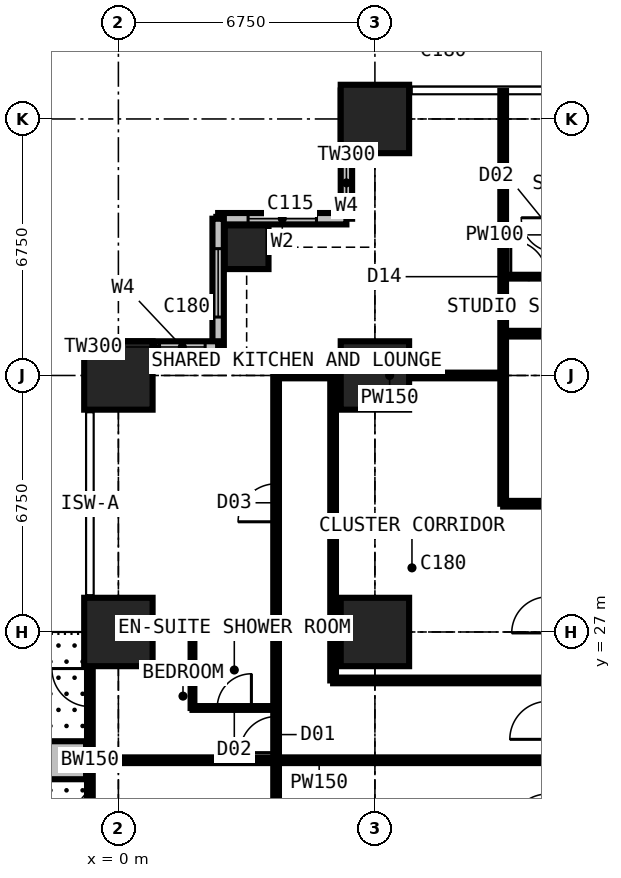
"""IFC4 building model, lengths in metres.
Left out: names, types, materials, properties, quantities, classifications, styles, units other than length and angle.
Written with IfcOpenShell. Run it as: python <this file> out.ifc"""

import sys

from ifc_helpers import new_model, si_unit, direction, frame, frame_2d, origin, origin_2d, place, context, subcontext, project, spatial, rectangle, extrude, element, fill, save


model = new_model("IFC4")
c1 = context("Model", 3, precision=1e-05, world=origin(), true_north=direction((0.0, 1.0)))
c2 = subcontext(c1, "Body", "Model", "MODEL_VIEW")
j1 = project(units=[si_unit("LENGTHUNIT", "METRE"), si_unit("PLANEANGLEUNIT", "RADIAN")], contexts=[c1])
p1 = place(None, origin())
s1 = spatial("IfcSite", under=j1, at=p1, CompositionType="ELEMENT")
p2 = place(p1, origin())
s2 = spatial("IfcBuilding", under=s1, at=p2, CompositionType="ELEMENT")
p3 = place(p2, frame((0.0, 0.0, 57.6)))
s3 = spatial("IfcBuildingStorey", under=s2, at=p3, CompositionType="ELEMENT", Elevation=57.6)
for number, where, z_axis, x_axis in (
    (1, (0.0, 27.0, 0.0), (0.0, 0.0, 1.0), (1.0, 0.0, 0.0)),
    (2, (0.0, 33.75, 0.0), (0.0, 0.0, 1.0), (1.0, 0.0, 0.0)),
):
    element("IfcColumn", number, at=place(p3, frame(where, z_axis=z_axis, x_axis=x_axis)), inside=s3, PredefinedType="COLUMN", context=c2, shape_type="SweptSolid", body=[
        extrude(rectangle(XDim=1.8, YDim=1.8, at=origin_2d()), origin(), (0.0, 0.0, 1.0), 3.6),
    ])
p4 = place(p3, frame((3.375, 37.125, 0.0), z_axis=(0.0, 0.0, 1.0), x_axis=(1.0, 0.0, 0.0)))
e3 = element("IfcColumn", 3, at=p4, inside=s3, PredefinedType="COLUMN", context=c2, shape_type="SweptSolid", body=[
    extrude(rectangle(XDim=1.15, YDim=1.15, at=origin_2d()), origin(), (0.0, 0.0, 1.0), 3.6),
])
for number, where, z_axis, x_axis in (
    (4, (6.75, 27.0, 0.0), (0.0, 0.0, 1.0), (1.0, 0.0, 0.0)),
    (5, (6.75, 33.75, 0.0), (0.0, 0.0, 1.0), (1.0, 0.0, 0.0)),
    (6, (6.75, 40.5, 0.0), (0.0, 0.0, 1.0), (1.0, 0.0, 0.0)),
):
    element("IfcColumn", number, at=place(p3, frame(where, z_axis=z_axis, x_axis=x_axis)), inside=s3, PredefinedType="COLUMN", context=c2, shape_type="SweptSolid", body=[
        extrude(rectangle(XDim=1.8, YDim=1.8, at=origin_2d()), origin(), (0.0, 0.0, 1.0), 3.6),
    ])
p5 = place(p3, frame((6.0, 41.25, 0.0), z_axis=(0.0, 0.0, 1.0), x_axis=(0.0, -1.0, 0.0)))
e7 = element("IfcWall", 7, at=p5, inside=s3, PredefinedType="SOLIDWALL", context=c2, shape_type="SweptSolid", body=[
    extrude(rectangle(XDim=3.375, YDim=0.3, at=frame_2d((1.688, 0.0))), origin(), (0.0, 0.0, 1.0), 3.375),
])
p6 = place(p5, frame((1.833, 0.0, 0.9)))
e8 = element("IfcOpeningElement", 8, at=p6, cuts=e7, PredefinedType="OPENING", context=c2, shape_type="SweptSolid", body=[
    extrude(rectangle(XDim=1.2, YDim=1.8, at=frame_2d((0.6, 0.9))), frame((0.0, 0.16, 0.0), z_axis=(0.0, -1.0, 0.0), x_axis=(1.0, 0.0, 0.0)), (0.0, 0.0, 1.0), 0.32),
])
p7 = place(p3, frame((6.0, 37.875, 0.0), z_axis=(0.0, 0.0, 1.0), x_axis=(-1.0, 0.0, 0.0)))
e9 = element("IfcWall", 9, at=p7, inside=s3, PredefinedType="SOLIDWALL", context=c2, shape_type="SweptSolid", body=[
    extrude(rectangle(XDim=3.375, YDim=0.3, at=frame_2d((1.688, 0.0))), origin(), (0.0, 0.0, 1.0), 3.375),
])
p8 = place(p7, frame((0.788, 0.0, 0.6)))
e10 = element("IfcOpeningElement", 10, at=p8, cuts=e9, PredefinedType="OPENING", context=c2, shape_type="SweptSolid", body=[
    extrude(rectangle(XDim=1.8, YDim=2.1, at=frame_2d((0.9, 1.05))), frame((0.0, 0.16, 0.0), z_axis=(0.0, -1.0, 0.0), x_axis=(1.0, 0.0, 0.0)), (0.0, 0.0, 1.0), 0.32),
])
p9 = place(p3, frame((2.625, 37.875, 0.0), z_axis=(0.0, 0.0, 1.0), x_axis=(0.0, -1.0, 0.0)))
e11 = element("IfcWall", 11, at=p9, inside=s3, PredefinedType="SOLIDWALL", context=c2, shape_type="SweptSolid", body=[
    extrude(rectangle(XDim=3.375, YDim=0.3, at=frame_2d((1.688, 0.0))), origin(), (0.0, 0.0, 1.0), 3.375),
])
p10 = place(p9, frame((0.788, 0.0, 0.6)))
e12 = element("IfcOpeningElement", 12, at=p10, cuts=e11, PredefinedType="OPENING", context=c2, shape_type="SweptSolid", body=[
    extrude(rectangle(XDim=1.8, YDim=2.1, at=frame_2d((0.9, 1.05))), frame((0.0, 0.16, 0.0), z_axis=(0.0, -1.0, 0.0), x_axis=(1.0, 0.0, 0.0)), (0.0, 0.0, 1.0), 0.32),
])
p11 = place(p3, frame((2.625, 34.5, 0.0), z_axis=(0.0, 0.0, 1.0), x_axis=(-1.0, 0.0, 0.0)))
e13 = element("IfcWall", 13, at=p11, inside=s3, PredefinedType="SOLIDWALL", context=c2, shape_type="SweptSolid", body=[
    extrude(rectangle(XDim=3.375, YDim=0.3, at=frame_2d((1.688, 0.0))), origin(), (0.0, 0.0, 1.0), 3.375),
])
p12 = place(p11, frame((0.343, 0.0, 0.9)))
e14 = element("IfcOpeningElement", 14, at=p12, cuts=e13, PredefinedType="OPENING", context=c2, shape_type="SweptSolid", body=[
    extrude(rectangle(XDim=1.2, YDim=1.8, at=frame_2d((0.6, 0.9))), frame((0.0, 0.16, 0.0), z_axis=(0.0, -1.0, 0.0), x_axis=(1.0, 0.0, 0.0)), (0.0, 0.0, 1.0), 0.32),
])
p13 = place(p3, frame((-0.75, 20.25, 0.0), z_axis=(0.0, 0.0, 1.0), x_axis=(0.0, 1.0, 0.0)))
e15 = element("IfcWall", 15, at=p13, inside=s3, PredefinedType="SOLIDWALL", context=c2, shape_type="SweptSolid", body=[
    extrude(rectangle(XDim=6.75, YDim=0.15, at=frame_2d((3.375, 0.0))), origin(), (0.0, 0.0, 1.0), 3.375),
])
p14 = place(p13, frame((0.962, 0.0, 0.0)))
e16 = element("IfcOpeningElement", 16, at=p14, cuts=e15, PredefinedType="OPENING", context=c2, shape_type="SweptSolid", body=[
    extrude(rectangle(XDim=1.0, YDim=2.2, at=frame_2d((0.5, 1.1))), frame((0.0, 0.085, 0.0), z_axis=(0.0, -1.0, 0.0), x_axis=(1.0, 0.0, 0.0)), (0.0, 0.0, 1.0), 0.17),
])
p15 = place(p13, frame((2.025, 0.0, 0.9)))
e17 = element("IfcOpeningElement", 17, at=p15, cuts=e15, PredefinedType="OPENING", context=c2, shape_type="SweptSolid", body=[
    extrude(rectangle(XDim=1.2, YDim=1.8, at=frame_2d((0.6, 0.9))), frame((0.0, 0.085, 0.0), z_axis=(0.0, -1.0, 0.0), x_axis=(1.0, 0.0, 0.0)), (0.0, 0.0, 1.0), 0.17),
])
p16 = place(p13, frame((4.788, 0.0, 0.0)))
e18 = element("IfcOpeningElement", 18, at=p16, cuts=e15, PredefinedType="OPENING", context=c2, shape_type="SweptSolid", body=[
    extrude(rectangle(XDim=1.0, YDim=2.2, at=frame_2d((0.5, 1.1))), frame((0.0, 0.085, 0.0), z_axis=(0.0, -1.0, 0.0), x_axis=(1.0, 0.0, 0.0)), (0.0, 0.0, 1.0), 0.17),
])
p17 = place(p13, frame((3.525, 0.0, 0.9)))
e19 = element("IfcOpeningElement", 19, at=p17, cuts=e15, PredefinedType="OPENING", context=c2, shape_type="SweptSolid", body=[
    extrude(rectangle(XDim=1.2, YDim=1.8, at=frame_2d((0.6, 0.9))), frame((0.0, 0.085, 0.0), z_axis=(0.0, -1.0, 0.0), x_axis=(1.0, 0.0, 0.0)), (0.0, 0.0, 1.0), 0.17),
])
p18 = place(p3, frame((-0.85, 23.625, 0.0), z_axis=(0.0, 0.0, 1.0), x_axis=(-1.0, 0.0, 0.0)))
e20 = element("IfcWall", 20, at=p18, inside=s3, PredefinedType="USERDEFINED", context=c2, shape_type="SweptSolid", body=[
    extrude(rectangle(XDim=2.2, YDim=1.0, at=frame_2d((1.1, 0.0))), origin(), (0.0, 0.0, 1.0), 0.9),
])
p19 = place(p3, frame((-0.734, 23.625, 0.0), z_axis=(0.0, 0.0, 1.0), x_axis=(1.0, 0.0, 0.0)))
e21 = element("IfcWall", 21, at=p19, inside=s3, PredefinedType="PARTITIONING", context=c2, shape_type="SweptSolid", body=[
    extrude(rectangle(XDim=12.034, YDim=0.15, at=frame_2d((6.017, 0.0))), origin(), (0.0, 0.0, 1.0), 3.375),
])
p20 = place(p3, frame((-0.734, 27.0, 0.0), z_axis=(0.0, 0.0, 1.0), x_axis=(1.0, 0.0, 0.0)))
e22 = element("IfcWall", 22, at=p20, inside=s3, PredefinedType="PARTITIONING", context=c2, shape_type="SweptSolid", body=[
    extrude(rectangle(XDim=4.884, YDim=0.15, at=frame_2d((2.442, 0.0))), origin(), (0.0, 0.0, 1.0), 2.877),
])
p21 = place(p3, frame((1.95, 25.0, 0.0), z_axis=(0.0, 0.0, 1.0), x_axis=(0.0, 1.0, 0.0)))
e23 = element("IfcWall", 23, at=p21, inside=s3, PredefinedType="PARTITIONING", context=c2, shape_type="SweptSolid", body=[
    extrude(rectangle(XDim=2.0, YDim=0.1, at=frame_2d((1.0, 0.0))), origin(), (0.0, 0.0, 1.0), 3.375),
])
p22 = place(p3, frame((1.95, 25.0, 0.0), z_axis=(0.0, 0.0, 1.0), x_axis=(1.0, 0.0, 0.0)))
e24 = element("IfcWall", 24, at=p22, inside=s3, PredefinedType="PARTITIONING", context=c2, shape_type="SweptSolid", body=[
    extrude(rectangle(XDim=2.2, YDim=0.1, at=frame_2d((1.1, 0.0))), origin(), (0.0, 0.0, 1.0), 3.375),
])
p23 = place(p22, frame((0.65, 0.0, 0.0)))
e25 = element("IfcOpeningElement", 25, at=p23, cuts=e24, PredefinedType="OPENING", context=c2, shape_type="SweptSolid", body=[
    extrude(rectangle(XDim=0.9, YDim=2.2, at=frame_2d((0.45, 1.1))), frame((0.0, 0.06, 0.0), z_axis=(0.0, -1.0, 0.0), x_axis=(1.0, 0.0, 0.0)), (0.0, 0.0, 1.0), 0.12),
])
p24 = place(p3, frame((4.15, 10.125, 0.0), z_axis=(0.0, 0.0, 1.0), x_axis=(0.0, 1.0, 0.0)))
e26 = element("IfcWall", 26, at=p24, inside=s3, PredefinedType="PARTITIONING", context=c2, shape_type="SweptSolid", body=[
    extrude(rectangle(XDim=23.625, YDim=0.15, at=frame_2d((11.812, 0.0))), origin(), (0.0, 0.0, 1.0), 3.375),
])
p25 = place(p24, frame((19.775, 0.0, 0.0)))
e27 = element("IfcOpeningElement", 27, at=p25, cuts=e26, PredefinedType="OPENING", context=c2, shape_type="SweptSolid", body=[
    extrude(rectangle(XDim=1.0, YDim=2.2, at=frame_2d((0.5, 1.1))), frame((0.0, 0.085, 0.0), z_axis=(0.0, -1.0, 0.0), x_axis=(1.0, 0.0, 0.0)), (0.0, 0.0, 1.0), 0.17),
])
p26 = place(p24, frame((13.7, 0.0, 0.0)))
e28 = element("IfcOpeningElement", 28, at=p26, cuts=e26, PredefinedType="OPENING", context=c2, shape_type="SweptSolid", body=[
    extrude(rectangle(XDim=0.95, YDim=2.2, at=frame_2d((0.475, 1.1))), frame((0.0, 0.085, 0.0), z_axis=(0.0, -1.0, 0.0), x_axis=(1.0, 0.0, 0.0)), (0.0, 0.0, 1.0), 0.17),
])
p27 = place(p24, frame((4.2, 0.0, 0.0)))
e29 = element("IfcOpeningElement", 29, at=p27, cuts=e26, PredefinedType="OPENING", context=c2, shape_type="SweptSolid", body=[
    extrude(rectangle(XDim=0.95, YDim=2.2, at=frame_2d((0.475, 1.1))), frame((0.0, 0.085, 0.0), z_axis=(0.0, -1.0, 0.0), x_axis=(1.0, 0.0, 0.0)), (0.0, 0.0, 1.0), 0.17),
])
p28 = place(p24, frame((10.95, 0.0, 0.0)))
e30 = element("IfcOpeningElement", 30, at=p28, cuts=e26, PredefinedType="OPENING", context=c2, shape_type="SweptSolid", body=[
    extrude(rectangle(XDim=0.95, YDim=2.2, at=frame_2d((0.475, 1.1))), frame((0.0, 0.085, 0.0), z_axis=(0.0, -1.0, 0.0), x_axis=(1.0, 0.0, 0.0)), (0.0, 0.0, 1.0), 0.17),
])
p29 = place(p3, frame((4.15, 33.75, 0.0), z_axis=(0.0, 0.0, 1.0), x_axis=(1.0, 0.0, 0.0)))
e31 = element("IfcWall", 31, at=p29, inside=s3, PredefinedType="PARTITIONING", context=c2, shape_type="SweptSolid", body=[
    extrude(rectangle(XDim=5.975, YDim=0.15, at=frame_2d((2.988, 0.0))), origin(), (0.0, 0.0, 1.0), 2.877),
])
p30 = place(p3, frame((5.65, 25.725, 0.0), z_axis=(0.0, 0.0, 1.0), x_axis=(0.0, 1.0, 0.0)))
e32 = element("IfcWall", 32, at=p30, inside=s3, PredefinedType="PARTITIONING", context=c2, shape_type="SweptSolid", body=[
    extrude(rectangle(XDim=8.025, YDim=0.15, at=frame_2d((4.012, 0.0))), origin(), (0.0, 0.0, 1.0), 3.375),
])
p31 = place(p3, frame((5.65, 25.725, 0.0), z_axis=(0.0, 0.0, 1.0), x_axis=(1.0, 0.0, 0.0)))
e33 = element("IfcWall", 33, at=p31, inside=s3, PredefinedType="PARTITIONING", context=c2, shape_type="SweptSolid", body=[
    extrude(rectangle(XDim=5.65, YDim=0.15, at=frame_2d((2.825, 0.0))), origin(), (0.0, 0.0, 1.0), 3.375),
])
p32 = place(p3, frame((10.125, 30.375, 0.0), z_axis=(0.0, 0.0, 1.0), x_axis=(0.0, 1.0, 0.0)))
e34 = element("IfcWall", 34, at=p32, inside=s3, PredefinedType="PARTITIONING", context=c2, shape_type="SweptSolid", body=[
    extrude(rectangle(XDim=10.859, YDim=0.15, at=frame_2d((5.429, 0.0))), origin(), (0.0, 0.0, 1.0), 3.375),
])
p33 = place(p3, frame((10.125, 30.375, 0.0), z_axis=(0.0, 0.0, 1.0), x_axis=(1.0, 0.0, 0.0)))
e35 = element("IfcWall", 35, at=p33, inside=s3, PredefinedType="PARTITIONING", context=c2, shape_type="SweptSolid", body=[
    extrude(rectangle(XDim=1.175, YDim=0.15, at=frame_2d((0.587, 0.0))), origin(), (0.0, 0.0, 1.0), 3.375),
])
p34 = place(p3, frame((10.125, 34.85, 0.0), z_axis=(0.0, 0.0, 1.0), x_axis=(1.0, 0.0, 0.0)))
e36 = element("IfcWall", 36, at=p34, inside=s3, PredefinedType="PARTITIONING", context=c2, shape_type="SweptSolid", body=[
    extrude(rectangle(XDim=10.762, YDim=0.15, at=frame_2d((5.381, 0.0))), origin(), (0.0, 0.0, 1.0), 3.375),
])
p35 = place(p34, frame((4.9, 0.0, 0.0)))
e37 = element("IfcOpeningElement", 37, at=p35, cuts=e36, PredefinedType="OPENING", context=c2, shape_type="SweptSolid", body=[
    extrude(rectangle(XDim=0.95, YDim=2.2, at=frame_2d((0.475, 1.1))), frame((0.0, 0.085, 0.0), z_axis=(0.0, -1.0, 0.0), x_axis=(1.0, 0.0, 0.0)), (0.0, 0.0, 1.0), 0.17),
])
p36 = place(p3, frame((10.125, 36.35, 0.0), z_axis=(0.0, 0.0, 1.0), x_axis=(1.0, 0.0, 0.0)))
e38 = element("IfcWall", 38, at=p36, inside=s3, PredefinedType="PARTITIONING", context=c2, shape_type="SweptSolid", body=[
    extrude(rectangle(XDim=23.625, YDim=0.1, at=frame_2d((11.812, 0.0))), origin(), (0.0, 0.0, 1.0), 3.375),
])
p37 = place(p36, frame((20.5, 0.0, 0.0)))
e39 = element("IfcOpeningElement", 39, at=p37, cuts=e38, PredefinedType="OPENING", context=c2, shape_type="SweptSolid", body=[
    extrude(rectangle(XDim=0.95, YDim=2.2, at=frame_2d((0.475, 1.1))), frame((0.0, 0.06, 0.0), z_axis=(0.0, -1.0, 0.0), x_axis=(1.0, 0.0, 0.0)), (0.0, 0.0, 1.0), 0.12),
])
p38 = place(p36, frame((17.125, 0.0, 0.0)))
e40 = element("IfcOpeningElement", 40, at=p38, cuts=e38, PredefinedType="OPENING", context=c2, shape_type="SweptSolid", body=[
    extrude(rectangle(XDim=0.95, YDim=2.2, at=frame_2d((0.475, 1.1))), frame((0.0, 0.06, 0.0), z_axis=(0.0, -1.0, 0.0), x_axis=(1.0, 0.0, 0.0)), (0.0, 0.0, 1.0), 0.12),
])
p39 = place(p36, frame((13.7, 0.0, 0.0)))
e41 = element("IfcOpeningElement", 41, at=p39, cuts=e38, PredefinedType="OPENING", context=c2, shape_type="SweptSolid", body=[
    extrude(rectangle(XDim=0.95, YDim=2.2, at=frame_2d((0.475, 1.1))), frame((0.0, 0.06, 0.0), z_axis=(0.0, -1.0, 0.0), x_axis=(1.0, 0.0, 0.0)), (0.0, 0.0, 1.0), 0.12),
])
p40 = place(p36, frame((0.2, 0.0, 0.0)))
e42 = element("IfcOpeningElement", 42, at=p40, cuts=e38, PredefinedType="OPENING", context=c2, shape_type="SweptSolid", body=[
    extrude(rectangle(XDim=0.95, YDim=2.2, at=frame_2d((0.475, 1.1))), frame((0.0, 0.06, 0.0), z_axis=(0.0, -1.0, 0.0), x_axis=(1.0, 0.0, 0.0)), (0.0, 0.0, 1.0), 0.12),
])
p41 = place(p36, frame((3.625, 0.0, 0.0)))
e43 = element("IfcOpeningElement", 43, at=p41, cuts=e38, PredefinedType="OPENING", context=c2, shape_type="SweptSolid", body=[
    extrude(rectangle(XDim=0.95, YDim=2.2, at=frame_2d((0.475, 1.1))), frame((0.0, 0.06, 0.0), z_axis=(0.0, -1.0, 0.0), x_axis=(1.0, 0.0, 0.0)), (0.0, 0.0, 1.0), 0.12),
])
p42 = place(p36, frame((7.0, 0.0, 0.0)))
e44 = element("IfcOpeningElement", 44, at=p42, cuts=e38, PredefinedType="OPENING", context=c2, shape_type="SweptSolid", body=[
    extrude(rectangle(XDim=0.95, YDim=2.2, at=frame_2d((0.475, 1.1))), frame((0.0, 0.06, 0.0), z_axis=(0.0, -1.0, 0.0), x_axis=(1.0, 0.0, 0.0)), (0.0, 0.0, 1.0), 0.12),
])
p43 = place(p36, frame((10.375, 0.0, 0.0)))
e45 = element("IfcOpeningElement", 45, at=p43, cuts=e38, PredefinedType="OPENING", context=c2, shape_type="SweptSolid", body=[
    extrude(rectangle(XDim=0.95, YDim=2.2, at=frame_2d((0.475, 1.1))), frame((0.0, 0.06, 0.0), z_axis=(0.0, -1.0, 0.0), x_axis=(1.0, 0.0, 0.0)), (0.0, 0.0, 1.0), 0.12),
])
p44 = place(p6, origin())
e46 = element("IfcWindow", 46, at=p44, inside=s3, PartitioningType="SINGLE_PANEL", PredefinedType="WINDOW", context=c2, shape_type="SweptSolid", body=[
    extrude(rectangle(XDim=1.2, YDim=1.8, at=frame_2d((0.6, 0.9))), frame((0.0, 0.03, 0.0), z_axis=(0.0, -1.0, 0.0), x_axis=(1.0, 0.0, 0.0)), (0.0, 0.0, 1.0), 0.06),
])
fill(e8, e46)
p45 = place(p8, origin())
e47 = element("IfcWindow", 47, at=p45, inside=s3, PartitioningType="SINGLE_PANEL", PredefinedType="WINDOW", context=c2, shape_type="SweptSolid", body=[
    extrude(rectangle(XDim=1.8, YDim=2.1, at=frame_2d((0.9, 1.05))), frame((0.0, 0.03, 0.0), z_axis=(0.0, -1.0, 0.0), x_axis=(1.0, 0.0, 0.0)), (0.0, 0.0, 1.0), 0.06),
])
fill(e10, e47)
p46 = place(p10, origin())
e48 = element("IfcWindow", 48, at=p46, inside=s3, PartitioningType="SINGLE_PANEL", PredefinedType="WINDOW", context=c2, shape_type="SweptSolid", body=[
    extrude(rectangle(XDim=1.8, YDim=2.1, at=frame_2d((0.9, 1.05))), frame((0.0, 0.03, 0.0), z_axis=(0.0, -1.0, 0.0), x_axis=(1.0, 0.0, 0.0)), (0.0, 0.0, 1.0), 0.06),
])
fill(e12, e48)
p47 = place(p12, origin())
e49 = element("IfcWindow", 49, at=p47, inside=s3, PartitioningType="SINGLE_PANEL", PredefinedType="WINDOW", context=c2, shape_type="SweptSolid", body=[
    extrude(rectangle(XDim=1.2, YDim=1.8, at=frame_2d((0.6, 0.9))), frame((0.0, 0.03, 0.0), z_axis=(0.0, -1.0, 0.0), x_axis=(1.0, 0.0, 0.0)), (0.0, 0.0, 1.0), 0.06),
])
fill(e14, e49)
p48 = place(p15, origin())
e50 = element("IfcWindow", 50, at=p48, inside=s3, PartitioningType="SINGLE_PANEL", PredefinedType="WINDOW", context=c2, shape_type="SweptSolid", body=[
    extrude(rectangle(XDim=1.2, YDim=1.8, at=frame_2d((0.6, 0.9))), frame((0.0, 0.03, 0.0), z_axis=(0.0, -1.0, 0.0), x_axis=(1.0, 0.0, 0.0)), (0.0, 0.0, 1.0), 0.06),
])
fill(e17, e50)
p49 = place(p16, origin())
e51 = element("IfcDoor", 51, at=p49, inside=s3, OperationType="SINGLE_SWING_RIGHT", PredefinedType="DOOR", context=c2, shape_type="SweptSolid", body=[
    extrude(rectangle(XDim=1.0, YDim=2.2, at=frame_2d((0.5, 1.1))), frame((0.0, 0.025, 0.0), z_axis=(0.0, -1.0, 0.0), x_axis=(1.0, 0.0, 0.0)), (0.0, 0.0, 1.0), 0.05),
])
fill(e18, e51)
p50 = place(p17, origin())
e52 = element("IfcWindow", 52, at=p50, inside=s3, PartitioningType="SINGLE_PANEL", PredefinedType="WINDOW", context=c2, shape_type="SweptSolid", body=[
    extrude(rectangle(XDim=1.2, YDim=1.8, at=frame_2d((0.6, 0.9))), frame((0.0, 0.03, 0.0), z_axis=(0.0, -1.0, 0.0), x_axis=(1.0, 0.0, 0.0)), (0.0, 0.0, 1.0), 0.06),
])
fill(e19, e52)
p51 = place(p40, origin())
e53 = element("IfcDoor", 53, at=p51, inside=s3, OperationType="SINGLE_SWING_LEFT", PredefinedType="DOOR", context=c2, shape_type="SweptSolid", body=[
    extrude(rectangle(XDim=0.95, YDim=2.2, at=frame_2d((0.475, 1.1))), frame((0.0, 0.025, 0.0), z_axis=(0.0, -1.0, 0.0), x_axis=(1.0, 0.0, 0.0)), (0.0, 0.0, 1.0), 0.05),
])
fill(e42, e53)
p52 = place(p25, origin())
e54 = element("IfcDoor", 54, at=p52, inside=s3, OperationType="SINGLE_SWING_LEFT", PredefinedType="DOOR", context=c2, shape_type="SweptSolid", body=[
    extrude(rectangle(XDim=1.0, YDim=2.2, at=frame_2d((0.5, 1.1))), frame((0.0, 0.025, 0.0), z_axis=(0.0, -1.0, 0.0), x_axis=(1.0, 0.0, 0.0)), (0.0, 0.0, 1.0), 0.05),
])
fill(e27, e54)
p53 = place(p26, origin())
e55 = element("IfcDoor", 55, at=p53, inside=s3, OperationType="SINGLE_SWING_LEFT", PredefinedType="DOOR", context=c2, shape_type="SweptSolid", body=[
    extrude(rectangle(XDim=0.95, YDim=2.2, at=frame_2d((0.475, 1.1))), frame((0.0, 0.025, 0.0), z_axis=(0.0, -1.0, 0.0), x_axis=(1.0, 0.0, 0.0)), (0.0, 0.0, 1.0), 0.05),
])
fill(e28, e55)
p54 = place(p23, origin())
e56 = element("IfcDoor", 56, at=p54, inside=s3, OperationType="SINGLE_SWING_RIGHT", PredefinedType="DOOR", context=c2, shape_type="SweptSolid", body=[
    extrude(rectangle(XDim=0.9, YDim=2.2, at=frame_2d((0.45, 1.1))), frame((0.0, 0.025, 0.0), z_axis=(0.0, -1.0, 0.0), x_axis=(1.0, 0.0, 0.0)), (0.0, 0.0, 1.0), 0.05),
])
fill(e25, e56)
save(model, sys.argv[1])
